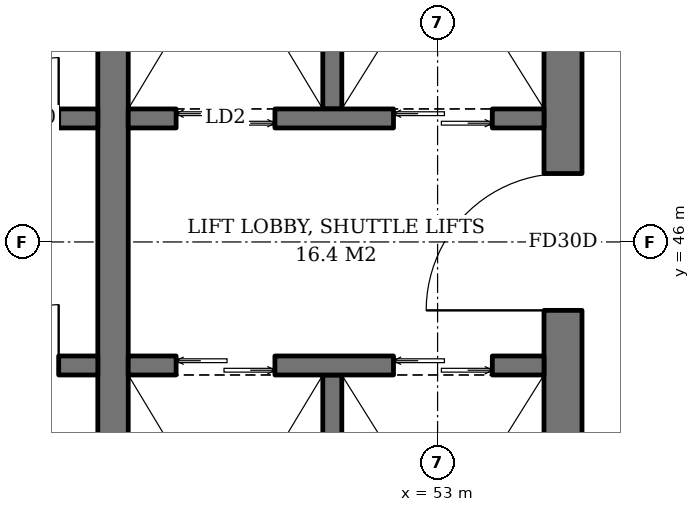
"""IFC4 building model, lengths in metres.
Left out: names, types, materials, properties, quantities, classifications, styles, units other than length and angle.
Written with IfcOpenShell. Run it as: python <this file> out.ifc"""

import sys

from ifc_helpers import new_model, si_unit, direction, frame, frame_2d, origin, place, context, subcontext, project, spatial, rectangle, extrude, element, fill, save


model = new_model("IFC4")
c1 = context("Model", 3, precision=1e-05, world=origin(), true_north=direction((0.0, 1.0)))
c2 = subcontext(c1, "Body", "Model", "MODEL_VIEW")
j1 = project(units=[si_unit("LENGTHUNIT", "METRE"), si_unit("PLANEANGLEUNIT", "RADIAN")], contexts=[c1])
p1 = place(None, origin())
s1 = spatial("IfcSite", under=j1, at=p1, CompositionType="ELEMENT")
p2 = place(p1, origin())
s2 = spatial("IfcBuilding", under=s1, at=p2, CompositionType="ELEMENT")
p3 = place(p2, frame((0.0, 0.0, 233.8)))
s3 = spatial("IfcBuildingStorey", under=s2, at=p3, CompositionType="ELEMENT", Elevation=233.8)
p4 = place(p3, frame((54.65, 36.6, 0.0), z_axis=(0.0, 0.0, 1.0), x_axis=(0.0, 1.0, 0.0)))
e1 = element("IfcWall", 1, at=p4, inside=s3, PredefinedType="SHEAR", context=c2, shape_type="SweptSolid", body=[
    extrude(rectangle(XDim=18.8, YDim=0.5, at=frame_2d((9.4, 0.0))), origin(), (0.0, 0.0, 1.0), 3.8),
])
p5 = place(p4, frame((8.5, 0.0, 0.0)))
e2 = element("IfcOpeningElement", 2, at=p5, cuts=e1, PredefinedType="OPENING", context=c2, shape_type="SweptSolid", body=[
    extrude(rectangle(XDim=1.8, YDim=2.4, at=frame_2d((0.9, 1.2))), frame((0.0, 0.26, 0.0), z_axis=(0.0, -1.0, 0.0), x_axis=(1.0, 0.0, 0.0)), (0.0, 0.0, 1.0), 0.52),
])
p6 = place(p3, frame((48.73, 40.0, 0.0), z_axis=(0.0, 0.0, 1.0), x_axis=(0.0, 1.0, 0.0)))
e3 = element("IfcWall", 3, at=p6, inside=s3, PredefinedType="SHEAR", context=c2, shape_type="SweptSolid", body=[
    extrude(rectangle(XDim=12.0, YDim=0.4, at=frame_2d((6.0, 0.0))), origin(), (0.0, 0.0, 1.0), 3.8),
])
p7 = place(p3, frame((35.6, 47.625, 0.0), z_axis=(0.0, 0.0, 1.0), x_axis=(1.0, 0.0, 0.0)))
e4 = element("IfcWall", 4, at=p7, inside=s3, PredefinedType="SHEAR", context=c2, shape_type="SweptSolid", body=[
    extrude(rectangle(XDim=12.93, YDim=0.25, at=frame_2d((6.465, 0.0))), origin(), (0.0, 0.0, 1.0), 3.8),
])
p8 = place(p7, frame((0.75, 0.0, 0.0)))
e5 = element("IfcOpeningElement", 5, at=p8, cuts=e4, PredefinedType="OPENING", context=c2, shape_type="SweptSolid", body=[
    extrude(rectangle(XDim=1.1, YDim=2.2, at=frame_2d((0.55, 1.1))), frame((0.0, 0.135, 0.0), z_axis=(0.0, -1.0, 0.0), x_axis=(1.0, 0.0, 0.0)), (0.0, 0.0, 1.0), 0.27),
])
p9 = place(p7, frame((3.55, 0.0, 0.0)))
e6 = element("IfcOpeningElement", 6, at=p9, cuts=e4, PredefinedType="OPENING", context=c2, shape_type="SweptSolid", body=[
    extrude(rectangle(XDim=1.1, YDim=2.2, at=frame_2d((0.55, 1.1))), frame((0.0, 0.135, 0.0), z_axis=(0.0, -1.0, 0.0), x_axis=(1.0, 0.0, 0.0)), (0.0, 0.0, 1.0), 0.27),
])
p10 = place(p7, frame((6.3, 0.0, 0.0)))
e7 = element("IfcOpeningElement", 7, at=p10, cuts=e4, PredefinedType="OPENING", context=c2, shape_type="SweptSolid", body=[
    extrude(rectangle(XDim=1.1, YDim=2.2, at=frame_2d((0.55, 1.1))), frame((0.0, 0.135, 0.0), z_axis=(0.0, -1.0, 0.0), x_axis=(1.0, 0.0, 0.0)), (0.0, 0.0, 1.0), 0.27),
])
p11 = place(p7, frame((9.1, 0.0, 0.0)))
e8 = element("IfcOpeningElement", 8, at=p11, cuts=e4, PredefinedType="OPENING", context=c2, shape_type="SweptSolid", body=[
    extrude(rectangle(XDim=1.0, YDim=2.1, at=frame_2d((0.5, 1.05))), frame((0.0, 0.135, 0.0), z_axis=(0.0, -1.0, 0.0), x_axis=(1.0, 0.0, 0.0)), (0.0, 0.0, 1.0), 0.27),
])
p12 = place(p7, frame((11.615, 0.0, 0.0)))
e9 = element("IfcOpeningElement", 9, at=p12, cuts=e4, PredefinedType="OPENING", context=c2, shape_type="SweptSolid", body=[
    extrude(rectangle(XDim=0.8, YDim=2.0, at=frame_2d((0.4, 1.0))), frame((0.0, 0.135, 0.0), z_axis=(0.0, -1.0, 0.0), x_axis=(1.0, 0.0, 0.0)), (0.0, 0.0, 1.0), 0.27),
])
p13 = place(p3, frame((35.6, 44.375, 0.0), z_axis=(0.0, 0.0, 1.0), x_axis=(1.0, 0.0, 0.0)))
e10 = element("IfcWall", 10, at=p13, inside=s3, PredefinedType="SHEAR", context=c2, shape_type="SweptSolid", body=[
    extrude(rectangle(XDim=12.93, YDim=0.25, at=frame_2d((6.465, 0.0))), origin(), (0.0, 0.0, 1.0), 3.8),
])
p14 = place(p13, frame((0.75, 0.0, 0.0)))
e11 = element("IfcOpeningElement", 11, at=p14, cuts=e10, PredefinedType="OPENING", context=c2, shape_type="SweptSolid", body=[
    extrude(rectangle(XDim=1.1, YDim=2.2, at=frame_2d((0.55, 1.1))), frame((0.0, 0.135, 0.0), z_axis=(0.0, -1.0, 0.0), x_axis=(1.0, 0.0, 0.0)), (0.0, 0.0, 1.0), 0.27),
])
p15 = place(p13, frame((3.55, 0.0, 0.0)))
e12 = element("IfcOpeningElement", 12, at=p15, cuts=e10, PredefinedType="OPENING", context=c2, shape_type="SweptSolid", body=[
    extrude(rectangle(XDim=1.1, YDim=2.2, at=frame_2d((0.55, 1.1))), frame((0.0, 0.135, 0.0), z_axis=(0.0, -1.0, 0.0), x_axis=(1.0, 0.0, 0.0)), (0.0, 0.0, 1.0), 0.27),
])
p16 = place(p13, frame((6.3, 0.0, 0.0)))
e13 = element("IfcOpeningElement", 13, at=p16, cuts=e10, PredefinedType="OPENING", context=c2, shape_type="SweptSolid", body=[
    extrude(rectangle(XDim=1.1, YDim=2.2, at=frame_2d((0.55, 1.1))), frame((0.0, 0.135, 0.0), z_axis=(0.0, -1.0, 0.0), x_axis=(1.0, 0.0, 0.0)), (0.0, 0.0, 1.0), 0.27),
])
p17 = place(p13, frame((9.1, 0.0, 0.0)))
e14 = element("IfcOpeningElement", 14, at=p17, cuts=e10, PredefinedType="OPENING", context=c2, shape_type="SweptSolid", body=[
    extrude(rectangle(XDim=1.0, YDim=2.1, at=frame_2d((0.5, 1.05))), frame((0.0, 0.135, 0.0), z_axis=(0.0, -1.0, 0.0), x_axis=(1.0, 0.0, 0.0)), (0.0, 0.0, 1.0), 0.27),
])
p18 = place(p13, frame((11.615, 0.0, 0.0)))
e15 = element("IfcOpeningElement", 15, at=p18, cuts=e10, PredefinedType="OPENING", context=c2, shape_type="SweptSolid", body=[
    extrude(rectangle(XDim=0.8, YDim=2.0, at=frame_2d((0.4, 1.0))), frame((0.0, 0.135, 0.0), z_axis=(0.0, -1.0, 0.0), x_axis=(1.0, 0.0, 0.0)), (0.0, 0.0, 1.0), 0.27),
])
p19 = place(p3, frame((51.615, 47.75, 0.0), z_axis=(0.0, 0.0, 1.0), x_axis=(0.0, 1.0, 0.0)))
e16 = element("IfcWall", 16, at=p19, inside=s3, PredefinedType="SHEAR", context=c2, shape_type="SweptSolid", body=[
    extrude(rectangle(XDim=4.25, YDim=0.25, at=frame_2d((2.125, 0.0))), origin(), (0.0, 0.0, 1.0), 3.8),
])
p20 = place(p3, frame((48.93, 47.625, 0.0), z_axis=(0.0, 0.0, 1.0), x_axis=(1.0, 0.0, 0.0)))
e17 = element("IfcWall", 17, at=p20, inside=s3, PredefinedType="SHEAR", context=c2, shape_type="SweptSolid", body=[
    extrude(rectangle(XDim=5.47, YDim=0.25, at=frame_2d((2.735, 0.0))), origin(), (0.0, 0.0, 1.0), 3.8),
])
p21 = place(p20, frame((0.63, 0.0, 0.0)))
e18 = element("IfcOpeningElement", 18, at=p21, cuts=e17, PredefinedType="OPENING", context=c2, shape_type="SweptSolid", body=[
    extrude(rectangle(XDim=1.3, YDim=2.2, at=frame_2d((0.65, 1.1))), frame((0.0, 0.135, 0.0), z_axis=(0.0, -1.0, 0.0), x_axis=(1.0, 0.0, 0.0)), (0.0, 0.0, 1.0), 0.27),
])
p22 = place(p20, frame((3.49, 0.0, 0.0)))
e19 = element("IfcOpeningElement", 19, at=p22, cuts=e17, PredefinedType="OPENING", context=c2, shape_type="SweptSolid", body=[
    extrude(rectangle(XDim=1.3, YDim=2.2, at=frame_2d((0.65, 1.1))), frame((0.0, 0.135, 0.0), z_axis=(0.0, -1.0, 0.0), x_axis=(1.0, 0.0, 0.0)), (0.0, 0.0, 1.0), 0.27),
])
p23 = place(p3, frame((51.615, 44.25, 0.0), z_axis=(0.0, 0.0, 1.0), x_axis=(0.0, -1.0, 0.0)))
e20 = element("IfcWall", 20, at=p23, inside=s3, PredefinedType="SHEAR", context=c2, shape_type="SweptSolid", body=[
    extrude(rectangle(XDim=4.25, YDim=0.25, at=frame_2d((2.125, 0.0))), origin(), (0.0, 0.0, 1.0), 3.8),
])
p24 = place(p3, frame((48.93, 44.375, 0.0), z_axis=(0.0, 0.0, 1.0), x_axis=(1.0, 0.0, 0.0)))
e21 = element("IfcWall", 21, at=p24, inside=s3, PredefinedType="SHEAR", context=c2, shape_type="SweptSolid", body=[
    extrude(rectangle(XDim=5.47, YDim=0.25, at=frame_2d((2.735, 0.0))), origin(), (0.0, 0.0, 1.0), 3.8),
])
p25 = place(p24, frame((0.63, 0.0, 0.0)))
e22 = element("IfcOpeningElement", 22, at=p25, cuts=e21, PredefinedType="OPENING", context=c2, shape_type="SweptSolid", body=[
    extrude(rectangle(XDim=1.3, YDim=2.2, at=frame_2d((0.65, 1.1))), frame((0.0, 0.135, 0.0), z_axis=(0.0, -1.0, 0.0), x_axis=(1.0, 0.0, 0.0)), (0.0, 0.0, 1.0), 0.27),
])
p26 = place(p24, frame((3.49, 0.0, 0.0)))
e23 = element("IfcOpeningElement", 23, at=p26, cuts=e21, PredefinedType="OPENING", context=c2, shape_type="SweptSolid", body=[
    extrude(rectangle(XDim=1.3, YDim=2.2, at=frame_2d((0.65, 1.1))), frame((0.0, 0.135, 0.0), z_axis=(0.0, -1.0, 0.0), x_axis=(1.0, 0.0, 0.0)), (0.0, 0.0, 1.0), 0.27),
])
p27 = place(p12, origin())
e24 = element("IfcDoor", 24, at=p27, inside=s3, OperationType="SINGLE_SWING_RIGHT", PredefinedType="DOOR", context=c2, shape_type="SweptSolid", body=[
    extrude(rectangle(XDim=0.8, YDim=2.0, at=frame_2d((0.4, 1.0))), frame((0.0, 0.025, 0.0), z_axis=(0.0, -1.0, 0.0), x_axis=(1.0, 0.0, 0.0)), (0.0, 0.0, 1.0), 0.05),
])
fill(e9, e24)
p28 = place(p18, origin())
e25 = element("IfcDoor", 25, at=p28, inside=s3, OperationType="SINGLE_SWING_RIGHT", PredefinedType="DOOR", context=c2, shape_type="SweptSolid", body=[
    extrude(rectangle(XDim=0.8, YDim=2.0, at=frame_2d((0.4, 1.0))), frame((0.0, 0.025, 0.0), z_axis=(0.0, -1.0, 0.0), x_axis=(1.0, 0.0, 0.0)), (0.0, 0.0, 1.0), 0.05),
])
fill(e15, e25)
p29 = place(p21, origin())
e26 = element("IfcDoor", 26, at=p29, inside=s3, OperationType="DOUBLE_DOOR_SLIDING", PredefinedType="DOOR", context=c2, shape_type="SweptSolid", body=[
    extrude(rectangle(XDim=1.3, YDim=2.2, at=frame_2d((0.65, 1.1))), frame((0.0, 0.025, 0.0), z_axis=(0.0, -1.0, 0.0), x_axis=(1.0, 0.0, 0.0)), (0.0, 0.0, 1.0), 0.05),
])
fill(e18, e26)
p30 = place(p22, origin())
e27 = element("IfcDoor", 27, at=p30, inside=s3, OperationType="DOUBLE_DOOR_SLIDING", PredefinedType="DOOR", context=c2, shape_type="SweptSolid", body=[
    extrude(rectangle(XDim=1.3, YDim=2.2, at=frame_2d((0.65, 1.1))), frame((0.0, 0.025, 0.0), z_axis=(0.0, -1.0, 0.0), x_axis=(1.0, 0.0, 0.0)), (0.0, 0.0, 1.0), 0.05),
])
fill(e19, e27)
p31 = place(p25, origin())
e28 = element("IfcDoor", 28, at=p31, inside=s3, OperationType="DOUBLE_DOOR_SLIDING", PredefinedType="DOOR", context=c2, shape_type="SweptSolid", body=[
    extrude(rectangle(XDim=1.3, YDim=2.2, at=frame_2d((0.65, 1.1))), frame((0.0, 0.025, 0.0), z_axis=(0.0, -1.0, 0.0), x_axis=(1.0, 0.0, 0.0)), (0.0, 0.0, 1.0), 0.05),
])
fill(e22, e28)
p32 = place(p26, origin())
e29 = element("IfcDoor", 29, at=p32, inside=s3, OperationType="DOUBLE_DOOR_SLIDING", PredefinedType="DOOR", context=c2, shape_type="SweptSolid", body=[
    extrude(rectangle(XDim=1.3, YDim=2.2, at=frame_2d((0.65, 1.1))), frame((0.0, 0.025, 0.0), z_axis=(0.0, -1.0, 0.0), x_axis=(1.0, 0.0, 0.0)), (0.0, 0.0, 1.0), 0.05),
])
fill(e23, e29)
p33 = place(p5, origin())
e30 = element("IfcDoor", 30, at=p33, inside=s3, OperationType="DOUBLE_DOOR_SINGLE_SWING", PredefinedType="DOOR", context=c2, shape_type="SweptSolid", body=[
    extrude(rectangle(XDim=1.8, YDim=2.4, at=frame_2d((0.9, 1.2))), frame((0.0, 0.025, 0.0), z_axis=(0.0, -1.0, 0.0), x_axis=(1.0, 0.0, 0.0)), (0.0, 0.0, 1.0), 0.05),
])
fill(e2, e30)
save(model, sys.argv[1])
